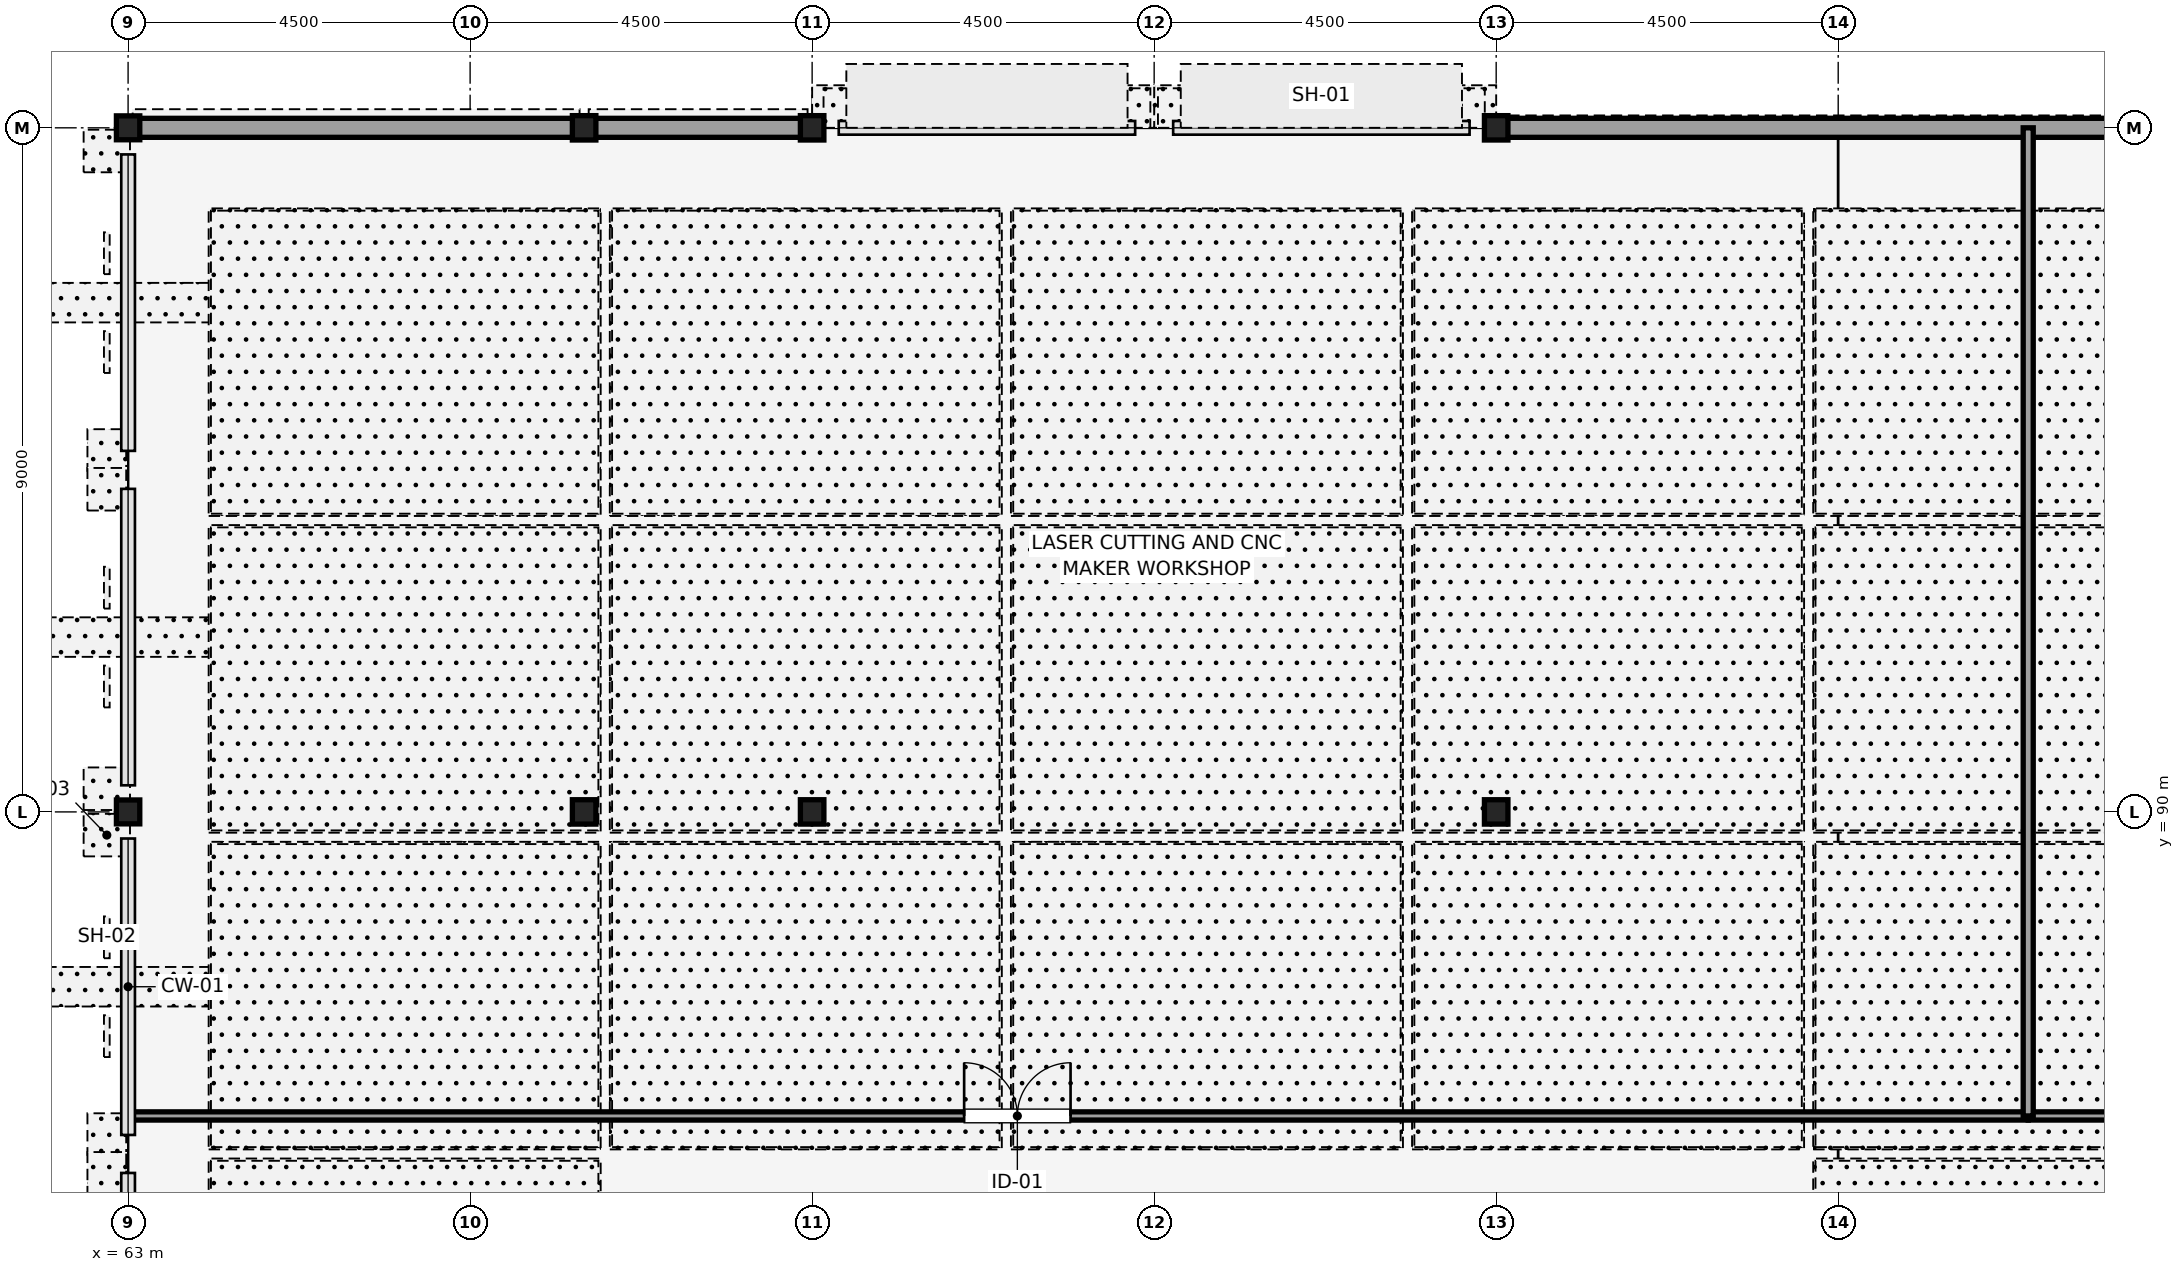
"""IFC4 building model, lengths in metres.
Left out: names, types, materials, properties, quantities, classifications, styles, units other than length and angle.
Written with IfcOpenShell. Run it as: python <this file> out.ifc"""

import sys

from ifc_helpers import new_model, si_unit, direction, frame, frame_2d, origin, origin_2d, place, context, subcontext, project, spatial, rectangle, i_section, extrude, element, fill, save


model = new_model("IFC4")
c1 = context("Model", 3, precision=1e-05, world=origin(), true_north=direction((0.0, 1.0)))
c2 = subcontext(c1, "Body", "Model", "MODEL_VIEW")
j1 = project(units=[si_unit("LENGTHUNIT", "METRE"), si_unit("PLANEANGLEUNIT", "RADIAN")], contexts=[c1])
p1 = place(None, origin())
s1 = spatial("IfcSite", under=j1, at=p1, CompositionType="ELEMENT")
p2 = place(p1, origin())
s2 = spatial("IfcBuilding", under=s1, at=p2, CompositionType="ELEMENT")
p3 = place(p2, frame((0.0, 0.0, 9.9)))
s3 = spatial("IfcBuildingStorey", under=s2, at=p3, CompositionType="ELEMENT", Elevation=9.9)
for number, where, z_axis, x_axis in (
    (1, (63.0, 90.0, 0.0), (0.0, 0.0, 1.0), (1.0, 0.0, 0.0)),
    (2, (63.0, 99.0, 0.0), (0.0, 0.0, 1.0), (1.0, 0.0, 0.0)),
):
    element("IfcColumn", number, at=place(p3, frame(where, z_axis=z_axis, x_axis=x_axis)), inside=s3, PredefinedType="COLUMN", context=c2, shape_type="SweptSolid", body=[
        extrude(i_section(OverallWidth=0.307, OverallDepth=0.315, WebThickness=0.012, FlangeThickness=0.019, FilletRadius=0.017, at=origin_2d()), origin(), (0.0, 0.0, 1.0), 4.5),
    ])
for number, where, z_axis, x_axis in (
    (3, (69.0, 90.0, 0.0), (0.0, 0.0, 1.0), (1.0, 0.0, 0.0)),
    (4, (69.0, 99.0, 0.0), (0.0, 0.0, 1.0), (1.0, 0.0, 0.0)),
    (5, (72.0, 90.0, 0.0), (0.0, 0.0, 1.0), (1.0, 0.0, 0.0)),
    (6, (72.0, 99.0, 0.0), (0.0, 0.0, 1.0), (1.0, 0.0, 0.0)),
    (7, (81.0, 90.0, 0.0), (0.0, 0.0, 1.0), (1.0, 0.0, 0.0)),
    (8, (81.0, 99.0, 0.0), (0.0, 0.0, 1.0), (1.0, 0.0, 0.0)),
):
    element("IfcColumn", number, at=place(p3, frame(where, z_axis=z_axis, x_axis=x_axis)), inside=s3, PredefinedType="COLUMN", context=c2, shape_type="SweptSolid", body=[
        extrude(i_section(OverallWidth=0.309, OverallDepth=0.321, WebThickness=0.014, FlangeThickness=0.022, FilletRadius=0.017, at=origin_2d()), origin(), (0.0, 0.0, 1.0), 4.5),
    ])
p4 = place(p3, frame((69.0, 99.0, 0.0), z_axis=(0.0, 0.0, 1.0), x_axis=(-1.0, 0.0, 0.0)))
e9 = element("IfcWall", 9, at=p4, inside=s3, PredefinedType="STANDARD", context=c2, shape_type="SweptSolid", body=[
    extrude(rectangle(XDim=6.0, YDim=0.25, at=frame_2d((3.0, 0.0))), origin(), (0.0, 0.0, 1.0), 3.894),
])
p5 = place(p3, frame((72.0, 99.0, 0.0), z_axis=(0.0, 0.0, 1.0), x_axis=(-1.0, 0.0, 0.0)))
e10 = element("IfcWall", 10, at=p5, inside=s3, PredefinedType="STANDARD", context=c2, shape_type="SweptSolid", body=[
    extrude(rectangle(XDim=3.0, YDim=0.25, at=frame_2d((1.5, 0.0))), origin(), (0.0, 0.0, 1.0), 3.894),
])
p6 = place(p3, frame((90.0, 99.0, 0.0), z_axis=(0.0, 0.0, 1.0), x_axis=(-1.0, 0.0, 0.0)))
e11 = element("IfcWall", 11, at=p6, inside=s3, PredefinedType="STANDARD", context=c2, shape_type="SweptSolid", body=[
    extrude(rectangle(XDim=9.0, YDim=0.25, at=frame_2d((4.5, 0.0))), origin(), (0.0, 0.0, 1.0), 3.767),
])
p7 = place(p3, frame((63.0, 86.0, 0.0), z_axis=(0.0, 0.0, 1.0), x_axis=(1.0, 0.0, 0.0)))
e12 = element("IfcWall", 12, at=p7, inside=s3, PredefinedType="PARTITIONING", context=c2, shape_type="SweptSolid", body=[
    extrude(rectangle(XDim=25.0, YDim=0.108, at=frame_2d((12.5, 0.0))), origin(), (0.0, 0.0, 1.0), 4.32),
])
p8 = place(p7, frame((11.0, 0.0, 0.0)))
e13 = element("IfcOpeningElement", 13, at=p8, cuts=e12, PredefinedType="OPENING", context=c2, shape_type="SweptSolid", body=[
    extrude(rectangle(XDim=1.4, YDim=2.2, at=frame_2d((0.7, 1.1))), frame((0.0, 0.064, 0.0), z_axis=(0.0, -1.0, 0.0), x_axis=(1.0, 0.0, 0.0)), (0.0, 0.0, 1.0), 0.128),
])
p9 = place(p3, frame((88.0, 86.0, 0.0), z_axis=(0.0, 0.0, 1.0), x_axis=(1.0, 0.0, 0.0)))
e14 = element("IfcWall", 14, at=p9, inside=s3, PredefinedType="PARTITIONING", context=c2, shape_type="SweptSolid", body=[
    extrude(rectangle(XDim=24.5, YDim=0.108, at=frame_2d((12.25, 0.0))), origin(), (0.0, 0.0, 1.0), 4.32),
])
p10 = place(p9, frame((7.0, 0.0, 0.0)))
e15 = element("IfcOpeningElement", 15, at=p10, cuts=e14, PredefinedType="OPENING", context=c2, shape_type="SweptSolid", body=[
    extrude(rectangle(XDim=1.4, YDim=2.2, at=frame_2d((0.7, 1.1))), frame((0.0, 0.064, 0.0), z_axis=(0.0, -1.0, 0.0), x_axis=(1.0, 0.0, 0.0)), (0.0, 0.0, 1.0), 0.128),
])
p11 = place(p3, frame((88.0, 86.0, 0.0), z_axis=(0.0, 0.0, 1.0), x_axis=(0.0, 1.0, 0.0)))
e16 = element("IfcWall", 16, at=p11, inside=s3, PredefinedType="PARTITIONING", context=c2, shape_type="SweptSolid", body=[
    extrude(rectangle(XDim=13.0, YDim=0.132, at=frame_2d((6.5, 0.0))), origin(), (0.0, 0.0, 1.0), 4.32),
])
p12 = place(p8, origin())
e17 = element("IfcDoor", 17, at=p12, inside=s3, OperationType="DOUBLE_DOOR_SINGLE_SWING", PredefinedType="DOOR", context=c2, shape_type="SweptSolid", body=[
    extrude(rectangle(XDim=1.4, YDim=2.2, at=frame_2d((0.7, 1.1))), frame((0.0, 0.025, 0.0), z_axis=(0.0, -1.0, 0.0), x_axis=(1.0, 0.0, 0.0)), (0.0, 0.0, 1.0), 0.05),
])
fill(e13, e17)
save(model, sys.argv[1])
